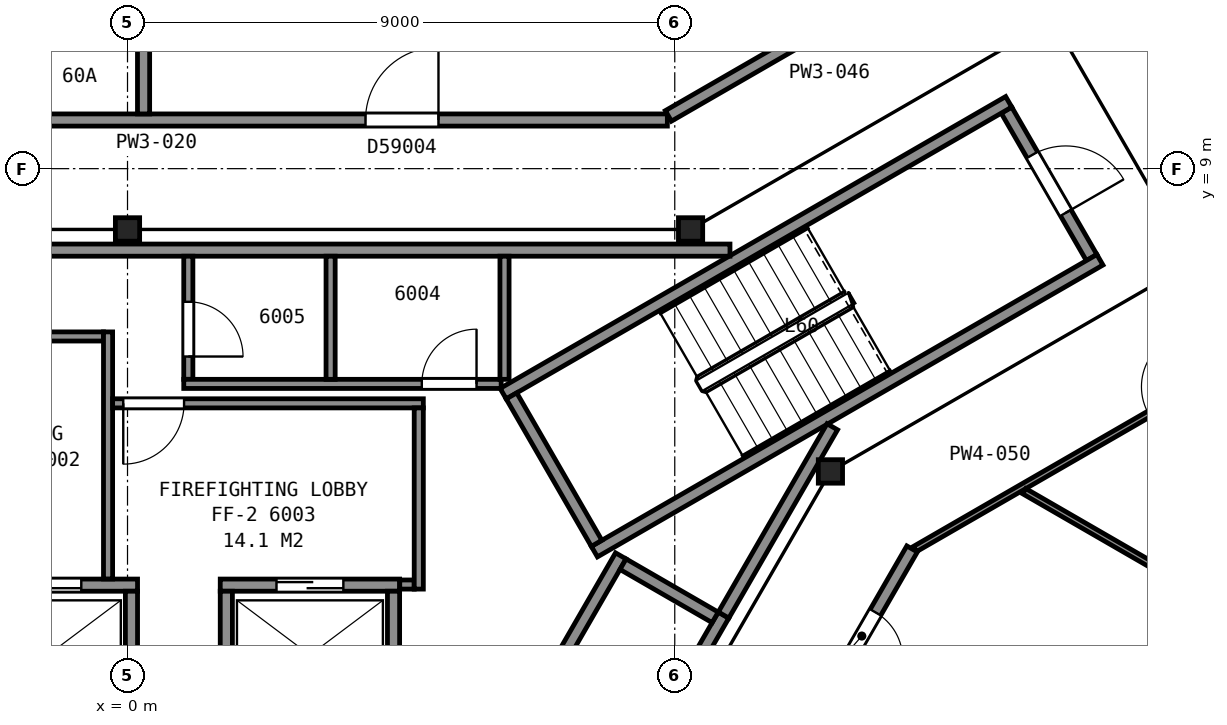
"""IFC4 building model, lengths in metres.
Left out: names, types, materials, properties, quantities, classifications, styles, units other than length and angle.
Written with IfcOpenShell. Run it as: python <this file> out.ifc"""

import sys

from ifc_helpers import new_model, si_unit, direction, frame, frame_2d, origin, origin_2d, place, context, subcontext, project, spatial, rectangle, i_section, extrude, element, fill, save


model = new_model("IFC4")
c1 = context("Model", 3, precision=1e-05, world=origin(), true_north=direction((0.0, 1.0)))
c2 = subcontext(c1, "Body", "Model", "MODEL_VIEW")
j1 = project(units=[si_unit("LENGTHUNIT", "METRE"), si_unit("PLANEANGLEUNIT", "RADIAN")], contexts=[c1])
p1 = place(None, origin())
s1 = spatial("IfcSite", under=j1, at=p1, CompositionType="ELEMENT")
p2 = place(p1, origin())
s2 = spatial("IfcBuilding", under=s1, at=p2, CompositionType="ELEMENT")
p3 = place(p2, frame((0.0, 0.0, 239.7)))
s3 = spatial("IfcBuildingStorey", under=s2, at=p3, CompositionType="ELEMENT", Elevation=239.7)
for number, where, z_axis, x_axis in (
    (1, (11.56, 4.02, 0.0), (0.0, 0.0, 1.0), (1.0, 0.0, 0.0)),
    (2, (9.26, 8.0, 0.0), (0.0, 0.0, 1.0), (1.0, 0.0, 0.0)),
    (3, (0.0, 8.0, 0.0), (0.0, 0.0, 1.0), (1.0, 0.0, 0.0)),
):
    element("IfcColumn", number, at=place(p3, frame(where, z_axis=z_axis, x_axis=x_axis)), inside=s3, PredefinedType="COLUMN", context=c2, shape_type="SweptSolid", body=[
        extrude(i_section(OverallWidth=0.399, OverallDepth=0.386, WebThickness=0.021, FlangeThickness=0.033, FilletRadius=0.015, at=origin_2d()), origin(), (0.0, 0.0, 1.0), 3.7),
    ])
p4 = place(p3, frame((15.855, 7.538, 0.0), z_axis=(0.0, 0.0, 1.0), x_axis=(-0.500049511043, 0.865996816683, 0.0)))
e4 = element("IfcWall", 4, at=p4, inside=s3, PredefinedType="PARTITIONING", context=c2, shape_type="SweptSolid", body=[
    extrude(rectangle(XDim=2.8, YDim=0.2, at=frame_2d((1.4, 0.0))), origin(), (0.0, 0.0, 1.0), 3.45),
])
p5 = place(p4, frame((0.85, 0.0, 0.0)))
e5 = element("IfcOpeningElement", 5, at=p5, cuts=e4, PredefinedType="OPENING", context=c2, shape_type="SweptSolid", body=[
    extrude(rectangle(XDim=1.1, YDim=2.1, at=frame_2d((0.55, 1.05))), frame((0.0, 0.11, 0.0), z_axis=(0.0, -1.0, 0.0), x_axis=(1.0, 0.0, 0.0)), (0.0, 0.0, 1.0), 0.22),
])
for number, where, z_axis, x_axis in (
    (6, (6.178, 5.299, 0.0), (0.0, 0.0, 1.0), (0.866, 0.5, 0.0)),
    (7, (7.678, 2.701, 0.0), (0.0, 0.0, 1.0), (0.866, 0.5, 0.0)),
):
    element("IfcWall", number, at=place(p3, frame(where, z_axis=z_axis, x_axis=x_axis)), inside=s3, PredefinedType="PARTITIONING", context=c2, shape_type="SweptSolid", body=[
        extrude(rectangle(XDim=9.6, YDim=0.2, at=frame_2d((4.8, 0.0))), origin(), (0.0, 0.0, 1.0), 3.45),
    ])
p6 = place(p3, frame((7.715, 2.838, 0.0), z_axis=(0.0, 0.0, 1.0), x_axis=(-0.500049511043, 0.865996816683, 0.0)))
e8 = element("IfcWall", 8, at=p6, inside=s3, PredefinedType="PARTITIONING", context=c2, shape_type="SweptSolid", body=[
    extrude(rectangle(XDim=2.8, YDim=0.2, at=frame_2d((1.4, 0.0))), origin(), (0.0, 0.0, 1.0), 3.45),
])
p7 = place(p3, frame((-2.785, 2.15, 0.0), z_axis=(0.0, 0.0, 1.0), x_axis=(1.0, 0.0, 0.0)))
e9 = element("IfcWall", 9, at=p7, inside=s3, PredefinedType="PARTITIONING", context=c2, shape_type="SweptSolid", body=[
    extrude(rectangle(XDim=2.95, YDim=0.2, at=frame_2d((1.475, 0.0))), origin(), (0.0, 0.0, 1.0), 3.7),
])
p8 = place(p7, frame((0.925, 0.0, 0.0)))
e10 = element("IfcOpeningElement", 10, at=p8, cuts=e9, PredefinedType="OPENING", context=c2, shape_type="SweptSolid", body=[
    extrude(rectangle(XDim=1.1, YDim=2.1, at=frame_2d((0.55, 1.05))), frame((0.0, 0.11, 0.0), z_axis=(0.0, -1.0, 0.0), x_axis=(1.0, 0.0, 0.0)), (0.0, 0.0, 1.0), 0.22),
])
p9 = place(p3, frame((1.525, 2.15, 0.0), z_axis=(0.0, 0.0, 1.0), x_axis=(1.0, 0.0, 0.0)))
e11 = element("IfcWall", 11, at=p9, inside=s3, PredefinedType="PARTITIONING", context=c2, shape_type="SweptSolid", body=[
    extrude(rectangle(XDim=2.95, YDim=0.2, at=frame_2d((1.475, 0.0))), origin(), (0.0, 0.0, 1.0), 3.7),
])
p10 = place(p9, frame((0.925, 0.0, 0.0)))
e12 = element("IfcOpeningElement", 12, at=p10, cuts=e11, PredefinedType="OPENING", context=c2, shape_type="SweptSolid", body=[
    extrude(rectangle(XDim=1.1, YDim=2.1, at=frame_2d((0.55, 1.05))), frame((0.0, 0.11, 0.0), z_axis=(0.0, -1.0, 0.0), x_axis=(1.0, 0.0, 0.0)), (0.0, 0.0, 1.0), 0.22),
])
p11 = place(p3, frame((7.351, -2.587, 0.0), z_axis=(0.0, 0.0, 1.0), x_axis=(0.500002801628, 0.866023786258, 0.0)))
e13 = element("IfcWall", 13, at=p11, inside=s3, PredefinedType="PARTITIONING", context=c2, shape_type="SweptSolid", body=[
    extrude(rectangle(XDim=4.9, YDim=0.2, at=frame_2d((2.45, 0.0))), origin(), (0.0, 0.0, 1.0), 3.7),
])
p12 = place(p3, frame((5.663, -1.612, 0.0), z_axis=(0.0, 0.0, 1.0), x_axis=(0.49998122708, 0.866036242063, 0.0)))
e14 = element("IfcWall", 14, at=p12, inside=s3, PredefinedType="PARTITIONING", context=c2, shape_type="SweptSolid", body=[
    extrude(rectangle(XDim=4.9, YDim=0.2, at=frame_2d((2.45, 0.0))), origin(), (0.0, 0.0, 1.0), 3.7),
])
for number, where, z_axis, x_axis in (
    (15, (4.375, 0.1, 0.0), (0.0, 0.0, 1.0), (0.0, 1.0, 0.0)),
    (16, (1.625, 0.1, 0.0), (0.0, 0.0, 1.0), (0.0, 1.0, 0.0)),
    (17, (0.065, 0.1, 0.0), (0.0, 0.0, 1.0), (0.0, 1.0, 0.0)),
):
    element("IfcWall", number, at=place(p3, frame(where, z_axis=z_axis, x_axis=x_axis)), inside=s3, PredefinedType="PARTITIONING", context=c2, shape_type="SweptSolid", body=[
        extrude(rectangle(XDim=1.95, YDim=0.2, at=frame_2d((0.975, 0.0))), origin(), (0.0, 0.0, 1.0), 3.7),
    ])
p13 = place(p3, frame((9.665, 1.62, 0.0), z_axis=(0.0, 0.0, 1.0), x_axis=(-0.866002029911, 0.500040482552, 0.0)))
e18 = element("IfcWall", 18, at=p13, inside=s3, PredefinedType="PARTITIONING", context=c2, shape_type="SweptSolid", body=[
    extrude(rectangle(XDim=1.75, YDim=0.2, at=frame_2d((0.875, 0.0))), origin(), (0.0, 0.0, 1.0), 3.7),
])
p14 = place(p3, frame((-3.933, 6.24, 0.0), z_axis=(0.0, 0.0, 1.0), x_axis=(1.0, 0.0, 0.0)))
e19 = element("IfcWall", 19, at=p14, inside=s3, PredefinedType="PARTITIONING", context=c2, shape_type="SweptSolid", body=[
    extrude(rectangle(XDim=3.538, YDim=0.15, at=frame_2d((1.769, 0.0))), origin(), (0.0, 0.0, 1.0), 3.45),
])
p15 = place(p14, frame((1.3, 0.0, 0.0)))
e20 = element("IfcOpeningElement", 20, at=p15, cuts=e19, PredefinedType="OPENING", context=c2, shape_type="SweptSolid", body=[
    extrude(rectangle(XDim=1.0, YDim=2.1, at=frame_2d((0.5, 1.05))), frame((0.0, 0.085, 0.0), z_axis=(0.0, -1.0, 0.0), x_axis=(1.0, 0.0, 0.0)), (0.0, 0.0, 1.0), 0.17),
])
p16 = place(p3, frame((-3.933, 7.66, 0.0), z_axis=(0.0, 0.0, 1.0), x_axis=(1.0, 0.0, 0.0)))
e21 = element("IfcWall", 21, at=p16, inside=s3, PredefinedType="PARTITIONING", context=c2, shape_type="SweptSolid", body=[
    extrude(rectangle(XDim=13.841, YDim=0.2, at=frame_2d((6.92, 0.0))), origin(), (0.0, 0.0, 1.0), 3.45),
])
p17 = place(p3, frame((-0.32, 2.252, 0.0), z_axis=(0.0, 0.0, 1.0), x_axis=(0.0, 1.0, 0.0)))
e22 = element("IfcWall", 22, at=p17, inside=s3, PredefinedType="PARTITIONING", context=c2, shape_type="SweptSolid", body=[
    extrude(rectangle(XDim=4.063, YDim=0.15, at=frame_2d((2.031, 0.0))), origin(), (0.0, 0.0, 1.0), 3.45),
])
p18 = place(p3, frame((-0.245, 5.14, 0.0), z_axis=(0.0, 0.0, 1.0), x_axis=(1.0, 0.0, 0.0)))
e23 = element("IfcWall", 23, at=p18, inside=s3, PredefinedType="PARTITIONING", context=c2, shape_type="SweptSolid", body=[
    extrude(rectangle(XDim=5.11, YDim=0.15, at=frame_2d((2.555, 0.0))), origin(), (0.0, 0.0, 1.0), 3.45),
])
p19 = place(p18, frame((0.175, 0.0, 0.0)))
e24 = element("IfcOpeningElement", 24, at=p19, cuts=e23, PredefinedType="OPENING", context=c2, shape_type="SweptSolid", body=[
    extrude(rectangle(XDim=1.0, YDim=2.1, at=frame_2d((0.5, 1.05))), frame((0.0, 0.085, 0.0), z_axis=(0.0, -1.0, 0.0), x_axis=(1.0, 0.0, 0.0)), (0.0, 0.0, 1.0), 0.17),
])
p20 = place(p3, frame((1.0, 7.56, 0.0), z_axis=(0.0, 0.0, 1.0), x_axis=(0.0, -1.0, 0.0)))
e25 = element("IfcWall", 25, at=p20, inside=s3, PredefinedType="PARTITIONING", context=c2, shape_type="SweptSolid", body=[
    extrude(rectangle(XDim=2.025, YDim=0.15, at=frame_2d((1.013, 0.0))), origin(), (0.0, 0.0, 1.0), 3.45),
])
p21 = place(p20, frame((0.75, 0.0, 0.0)))
e26 = element("IfcOpeningElement", 26, at=p21, cuts=e25, PredefinedType="OPENING", context=c2, shape_type="SweptSolid", body=[
    extrude(rectangle(XDim=0.9, YDim=2.1, at=frame_2d((0.45, 1.05))), frame((0.0, 0.085, 0.0), z_axis=(0.0, -1.0, 0.0), x_axis=(1.0, 0.0, 0.0)), (0.0, 0.0, 1.0), 0.17),
])
p22 = place(p3, frame((0.925, 5.46, 0.0), z_axis=(0.0, 0.0, 1.0), x_axis=(1.0, 0.0, 0.0)))
e27 = element("IfcWall", 27, at=p22, inside=s3, PredefinedType="PARTITIONING", context=c2, shape_type="SweptSolid", body=[
    extrude(rectangle(XDim=5.22, YDim=0.15, at=frame_2d((2.61, 0.0))), origin(), (0.0, 0.0, 1.0), 3.45),
])
p23 = place(p22, frame((3.915, 0.0, 0.0)))
e28 = element("IfcOpeningElement", 28, at=p23, cuts=e27, PredefinedType="OPENING", context=c2, shape_type="SweptSolid", body=[
    extrude(rectangle(XDim=0.9, YDim=2.1, at=frame_2d((0.45, 1.05))), frame((0.0, 0.085, 0.0), z_axis=(0.0, -1.0, 0.0), x_axis=(1.0, 0.0, 0.0)), (0.0, 0.0, 1.0), 0.17),
])
p24 = place(p3, frame((3.34, 5.535, 0.0), z_axis=(0.0, 0.0, 1.0), x_axis=(0.0, 1.0, 0.0)))
e29 = element("IfcWall", 29, at=p24, inside=s3, PredefinedType="PARTITIONING", context=c2, shape_type="SweptSolid", body=[
    extrude(rectangle(XDim=2.025, YDim=0.15, at=frame_2d((1.013, 0.0))), origin(), (0.0, 0.0, 1.0), 3.45),
])
p25 = place(p3, frame((4.477, 2.16, 0.0), z_axis=(0.0, 0.0, 1.0), x_axis=(1.0, 0.0, 0.0)))
e30 = element("IfcWall", 30, at=p25, inside=s3, PredefinedType="PARTITIONING", context=c2, shape_type="SweptSolid", body=[
    extrude(rectangle(XDim=0.238, YDim=0.15, at=frame_2d((0.119, 0.0))), origin(), (0.0, 0.0, 1.0), 3.45),
])
p26 = place(p3, frame((4.79, 2.085, 0.0), z_axis=(0.0, 0.0, 1.0), x_axis=(0.0, 1.0, 0.0)))
e31 = element("IfcWall", 31, at=p26, inside=s3, PredefinedType="PARTITIONING", context=c2, shape_type="SweptSolid", body=[
    extrude(rectangle(XDim=2.98, YDim=0.15, at=frame_2d((1.49, 0.0))), origin(), (0.0, 0.0, 1.0), 3.45),
])
p27 = place(p3, frame((6.2, 5.535, 0.0), z_axis=(0.0, 0.0, 1.0), x_axis=(0.0, 1.0, 0.0)))
e32 = element("IfcWall", 32, at=p27, inside=s3, PredefinedType="PARTITIONING", context=c2, shape_type="SweptSolid", body=[
    extrude(rectangle(XDim=2.025, YDim=0.15, at=frame_2d((1.013, 0.0))), origin(), (0.0, 0.0, 1.0), 3.45),
])
p28 = place(p3, frame((9.803, 1.658, 0.0), z_axis=(0.0, 0.0, 1.0), x_axis=(0.499943114462, 0.866058244174, 0.0)))
e33 = element("IfcWall", 33, at=p28, inside=s3, PredefinedType="PARTITIONING", context=c2, shape_type="SweptSolid", body=[
    extrude(rectangle(XDim=3.576, YDim=0.2, at=frame_2d((1.788, 0.0))), origin(), (0.0, 0.0, 1.0), 3.45),
])
p29 = place(p3, frame((-8.878, 9.8, 0.0), z_axis=(0.0, 0.0, 1.0), x_axis=(1.0, 0.0, 0.0)))
e34 = element("IfcWall", 34, at=p29, inside=s3, PredefinedType="PARTITIONING", context=c2, shape_type="SweptSolid", body=[
    extrude(rectangle(XDim=17.756, YDim=0.2, at=frame_2d((8.878, 0.0))), origin(), (0.0, 0.0, 1.0), 2.713),
])
p30 = place(p29, frame((12.792, 0.0, 0.0)))
e35 = element("IfcOpeningElement", 35, at=p30, cuts=e34, PredefinedType="OPENING", context=c2, shape_type="SweptSolid", body=[
    extrude(rectangle(XDim=1.2, YDim=2.1, at=frame_2d((0.6, 1.05))), frame((0.0, 0.11, 0.0), z_axis=(0.0, -1.0, 0.0), x_axis=(1.0, 0.0, 0.0)), (0.0, 0.0, 1.0), 0.22),
])
p31 = place(p29, frame((5.013, 0.0, 0.0)))
e36 = element("IfcOpeningElement", 36, at=p31, cuts=e34, PredefinedType="OPENING", context=c2, shape_type="SweptSolid", body=[
    extrude(rectangle(XDim=0.9, YDim=2.1, at=frame_2d((0.45, 1.05))), frame((0.0, 0.11, 0.0), z_axis=(0.0, -1.0, 0.0), x_axis=(1.0, 0.0, 0.0)), (0.0, 0.0, 1.0), 0.22),
])
p32 = place(p29, frame((1.834, 0.0, 0.0)))
e37 = element("IfcOpeningElement", 37, at=p32, cuts=e34, PredefinedType="OPENING", context=c2, shape_type="SweptSolid", body=[
    extrude(rectangle(XDim=0.9, YDim=2.1, at=frame_2d((0.45, 1.05))), frame((0.0, 0.11, 0.0), z_axis=(0.0, -1.0, 0.0), x_axis=(1.0, 0.0, 0.0)), (0.0, 0.0, 1.0), 0.22),
])
p33 = place(p3, frame((0.264, 9.9, 0.0), z_axis=(0.0, 0.0, 1.0), x_axis=(0.0, 1.0, 0.0)))
e38 = element("IfcWall", 38, at=p33, inside=s3, PredefinedType="PARTITIONING", context=c2, shape_type="SweptSolid", body=[
    extrude(rectangle(XDim=6.306, YDim=0.2, at=frame_2d((3.153, 0.0))), origin(), (0.0, 0.0, 1.0), 2.713),
])
p34 = place(p3, frame((12.903, 2.745, 0.0), z_axis=(0.0, 0.0, 1.0), x_axis=(-0.499997769292, -0.86602669168, 0.0)))
e39 = element("IfcWall", 39, at=p34, inside=s3, PredefinedType="PARTITIONING", context=c2, shape_type="SweptSolid", body=[
    extrude(rectangle(XDim=17.706, YDim=0.2, at=frame_2d((8.853, 0.0))), origin(), (0.0, 0.0, 1.0), 2.713),
])
p35 = place(p34, frame((14.637, 0.0, 0.0)))
e40 = element("IfcOpeningElement", 40, at=p35, cuts=e39, PredefinedType="OPENING", context=c2, shape_type="SweptSolid", body=[
    extrude(rectangle(XDim=0.9, YDim=2.1, at=frame_2d((0.45, 1.05))), frame((0.0, 0.11, 0.0), z_axis=(0.0, -1.0, 0.0), x_axis=(1.0, 0.0, 0.0)), (0.0, 0.0, 1.0), 0.22),
])
p36 = place(p34, frame((11.858, 0.0, 0.0)))
e41 = element("IfcOpeningElement", 41, at=p36, cuts=e39, PredefinedType="OPENING", context=c2, shape_type="SweptSolid", body=[
    extrude(rectangle(XDim=0.9, YDim=2.1, at=frame_2d((0.45, 1.05))), frame((0.0, 0.11, 0.0), z_axis=(0.0, -1.0, 0.0), x_axis=(1.0, 0.0, 0.0)), (0.0, 0.0, 1.0), 0.22),
])
p37 = place(p34, frame((5.303, 0.0, 0.0)))
e42 = element("IfcOpeningElement", 42, at=p37, cuts=e39, PredefinedType="OPENING", context=c2, shape_type="SweptSolid", body=[
    extrude(rectangle(XDim=0.9, YDim=2.1, at=frame_2d((0.45, 1.05))), frame((0.0, 0.11, 0.0), z_axis=(0.0, -1.0, 0.0), x_axis=(1.0, 0.0, 0.0)), (0.0, 0.0, 1.0), 0.22),
])
p38 = place(p34, frame((1.204, 0.0, 0.0)))
e43 = element("IfcOpeningElement", 43, at=p38, cuts=e39, PredefinedType="OPENING", context=c2, shape_type="SweptSolid", body=[
    extrude(rectangle(XDim=0.9, YDim=2.1, at=frame_2d((0.45, 1.05))), frame((0.0, 0.11, 0.0), z_axis=(0.0, -1.0, 0.0), x_axis=(1.0, 0.0, 0.0)), (0.0, 0.0, 1.0), 0.22),
])
p39 = place(p3, frame((8.895, 9.867, 0.0), z_axis=(0.0, 0.0, 1.0), x_axis=(0.866081499088, 0.499902827495, 0.0)))
e44 = element("IfcWall", 44, at=p39, inside=s3, PredefinedType="PARTITIONING", context=c2, shape_type="SweptSolid", body=[
    extrude(rectangle(XDim=8.163, YDim=0.2, at=frame_2d((4.081, 0.0))), origin(), (0.0, 0.0, 1.0), 2.713),
])
p40 = place(p39, frame((4.525, 0.0, 0.0)))
e45 = element("IfcOpeningElement", 45, at=p40, cuts=e44, PredefinedType="OPENING", context=c2, shape_type="SweptSolid", body=[
    extrude(rectangle(XDim=0.9, YDim=2.1, at=frame_2d((0.45, 1.05))), frame((0.0, 0.11, 0.0), z_axis=(0.0, -1.0, 0.0), x_axis=(1.0, 0.0, 0.0)), (0.0, 0.0, 1.0), 0.22),
])
p41 = place(p3, frame((19.98, 6.801, 0.0), z_axis=(0.0, 0.0, 1.0), x_axis=(-0.866087400697, -0.49989260282, 0.0)))
e46 = element("IfcWall", 46, at=p41, inside=s3, PredefinedType="PARTITIONING", context=c2, shape_type="SweptSolid", body=[
    extrude(rectangle(XDim=8.115, YDim=0.1, at=frame_2d((4.058, 0.0))), origin(), (0.0, 0.0, 1.0), 2.713),
])
p42 = place(p41, frame((2.777, 0.0, 0.0)))
e47 = element("IfcOpeningElement", 47, at=p42, cuts=e46, PredefinedType="OPENING", context=c2, shape_type="SweptSolid", body=[
    extrude(rectangle(XDim=0.9, YDim=2.1, at=frame_2d((0.45, 1.05))), frame((0.0, 0.06, 0.0), z_axis=(0.0, -1.0, 0.0), x_axis=(1.0, 0.0, 0.0)), (0.0, 0.0, 1.0), 0.12),
])
p43 = place(p3, frame((14.748, 3.695, 0.0), z_axis=(0.0, 0.0, 1.0), x_axis=(0.86599232748, -0.500057285464, 0.0)))
e48 = element("IfcWall", 48, at=p43, inside=s3, PredefinedType="PARTITIONING", context=c2, shape_type="SweptSolid", body=[
    extrude(rectangle(XDim=5.281, YDim=0.1, at=frame_2d((2.64, 0.0))), origin(), (0.0, 0.0, 1.0), 2.713),
])
p44 = place(p3, frame((15.928, 13.812, 0.0), z_axis=(0.0, 0.0, 1.0), x_axis=(0.500422653123, -0.865781247337, 0.0)))
e49 = element("IfcWall", 49, at=p44, inside=s3, PredefinedType="PARTITIONING", context=c2, shape_type="SweptSolid", body=[
    extrude(rectangle(XDim=8.047, YDim=0.2, at=frame_2d((4.024, 0.0))), origin(), (0.0, 0.0, 1.0), 2.713),
])
p45 = place(p44, frame((5.337, 0.0, 0.0)))
e50 = element("IfcOpeningElement", 50, at=p45, cuts=e49, PredefinedType="OPENING", context=c2, shape_type="SweptSolid", body=[
    extrude(rectangle(XDim=0.9, YDim=2.1, at=frame_2d((0.45, 1.05))), frame((0.0, 0.11, 0.0), z_axis=(0.0, -1.0, 0.0), x_axis=(1.0, 0.0, 0.0)), (0.0, 0.0, 1.0), 0.22),
])
p46 = place(p5, origin())
e51 = element("IfcDoor", 51, at=p46, inside=s3, OperationType="SINGLE_SWING_LEFT", PredefinedType="DOOR", context=c2, shape_type="SweptSolid", body=[
    extrude(rectangle(XDim=1.1, YDim=2.1, at=frame_2d((0.55, 1.05))), frame((0.0, 0.025, 0.0), z_axis=(0.0, -1.0, 0.0), x_axis=(1.0, 0.0, 0.0)), (0.0, 0.0, 1.0), 0.05),
])
fill(e5, e51)
p47 = place(p8, origin())
e52 = element("IfcDoor", 52, at=p47, inside=s3, OperationType="SLIDING_TO_LEFT", PredefinedType="DOOR", context=c2, shape_type="SweptSolid", body=[
    extrude(rectangle(XDim=1.1, YDim=2.1, at=frame_2d((0.55, 1.05))), frame((0.0, 0.025, 0.0), z_axis=(0.0, -1.0, 0.0), x_axis=(1.0, 0.0, 0.0)), (0.0, 0.0, 1.0), 0.05),
])
fill(e10, e52)
p48 = place(p10, origin())
e53 = element("IfcDoor", 53, at=p48, inside=s3, OperationType="SLIDING_TO_RIGHT", PredefinedType="DOOR", context=c2, shape_type="SweptSolid", body=[
    extrude(rectangle(XDim=1.1, YDim=2.1, at=frame_2d((0.55, 1.05))), frame((0.0, 0.025, 0.0), z_axis=(0.0, -1.0, 0.0), x_axis=(1.0, 0.0, 0.0)), (0.0, 0.0, 1.0), 0.05),
])
fill(e12, e53)
p49 = place(p19, origin())
e54 = element("IfcDoor", 54, at=p49, inside=s3, OperationType="SINGLE_SWING_LEFT", PredefinedType="DOOR", context=c2, shape_type="SweptSolid", body=[
    extrude(rectangle(XDim=1.0, YDim=2.1, at=frame_2d((0.5, 1.05))), frame((0.0, 0.025, 0.0), z_axis=(0.0, -1.0, 0.0), x_axis=(1.0, 0.0, 0.0)), (0.0, 0.0, 1.0), 0.05),
])
fill(e24, e54)
p50 = place(p21, origin())
e55 = element("IfcDoor", 55, at=p50, inside=s3, OperationType="SINGLE_SWING_RIGHT", PredefinedType="DOOR", context=c2, shape_type="SweptSolid", body=[
    extrude(rectangle(XDim=0.9, YDim=2.1, at=frame_2d((0.45, 1.05))), frame((0.0, 0.025, 0.0), z_axis=(0.0, -1.0, 0.0), x_axis=(1.0, 0.0, 0.0)), (0.0, 0.0, 1.0), 0.05),
])
fill(e26, e55)
p51 = place(p23, origin())
e56 = element("IfcDoor", 56, at=p51, inside=s3, OperationType="SINGLE_SWING_RIGHT", PredefinedType="DOOR", context=c2, shape_type="SweptSolid", body=[
    extrude(rectangle(XDim=0.9, YDim=2.1, at=frame_2d((0.45, 1.05))), frame((0.0, 0.025, 0.0), z_axis=(0.0, -1.0, 0.0), x_axis=(1.0, 0.0, 0.0)), (0.0, 0.0, 1.0), 0.05),
])
fill(e28, e56)
p52 = place(p30, origin())
e57 = element("IfcDoor", 57, at=p52, inside=s3, OperationType="SINGLE_SWING_RIGHT", PredefinedType="DOOR", context=c2, shape_type="SweptSolid", body=[
    extrude(rectangle(XDim=1.2, YDim=2.1, at=frame_2d((0.6, 1.05))), frame((0.0, 0.025, 0.0), z_axis=(0.0, -1.0, 0.0), x_axis=(1.0, 0.0, 0.0)), (0.0, 0.0, 1.0), 0.05),
])
fill(e35, e57)
p53 = place(p38, origin())
e58 = element("IfcDoor", 58, at=p53, inside=s3, OperationType="SINGLE_SWING_RIGHT", PredefinedType="DOOR", context=c2, shape_type="SweptSolid", body=[
    extrude(rectangle(XDim=0.9, YDim=2.1, at=frame_2d((0.45, 1.05))), frame((0.0, 0.025, 0.0), z_axis=(0.0, -1.0, 0.0), x_axis=(1.0, 0.0, 0.0)), (0.0, 0.0, 1.0), 0.05),
])
fill(e43, e58)
save(model, sys.argv[1])
